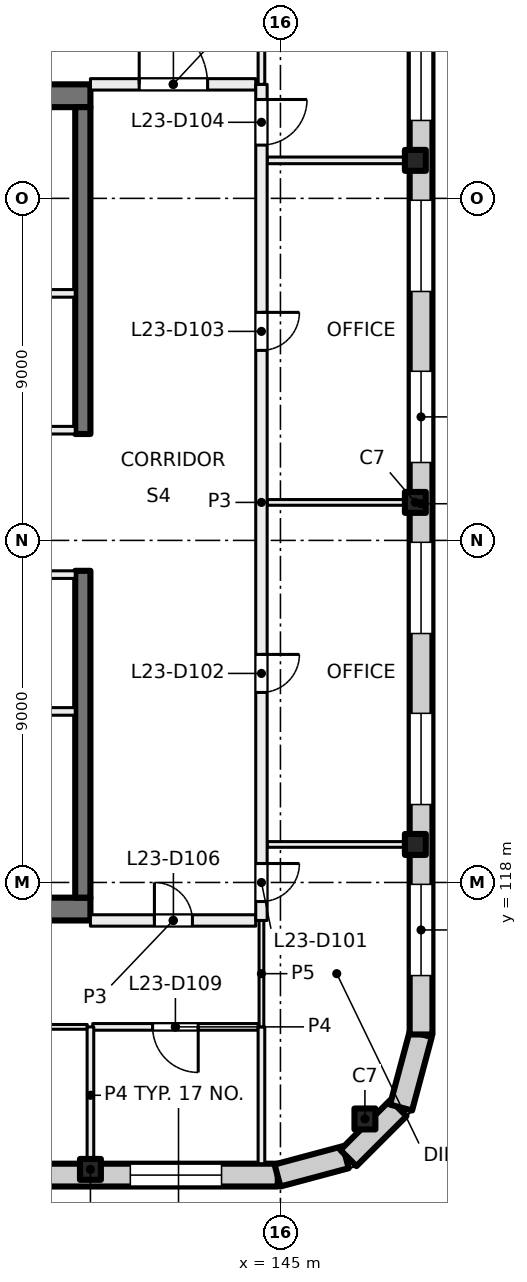
"""IFC4 building model, lengths in metres.
Left out: names, types, materials, properties, quantities, classifications, styles, units other than length and angle.
Written with IfcOpenShell. Run it as: python <this file> out.ifc"""

import sys

from ifc_helpers import new_model, si_unit, direction, frame, frame_2d, origin, origin_2d, place, context, subcontext, project, spatial, rectangle, extrude, element, fill, save


model = new_model("IFC4")
c1 = context("Model", 3, precision=1e-05, world=origin(), true_north=direction((0.0, 1.0)))
c2 = subcontext(c1, "Body", "Model", "MODEL_VIEW")
j1 = project(units=[si_unit("LENGTHUNIT", "METRE"), si_unit("PLANEANGLEUNIT", "RADIAN")], contexts=[c1])
p1 = place(None, origin())
s1 = spatial("IfcSite", under=j1, at=p1, CompositionType="ELEMENT")
p2 = place(p1, origin())
s2 = spatial("IfcBuilding", under=s1, at=p2, CompositionType="ELEMENT")
p3 = place(p2, frame((0.0, 0.0, 101.0)))
s3 = spatial("IfcBuildingStorey", under=s2, at=p3, CompositionType="ELEMENT", Elevation=101.0)
for number, where, z_axis, x_axis in (
    (1, (148.55, 119.0, 0.0), (0.0, 0.0, 1.0), (1.0, 0.0, 0.0)),
    (2, (148.55, 128.0, 0.0), (0.0, 0.0, 1.0), (1.0, 0.0, 0.0)),
    (3, (148.55, 137.0, 0.0), (0.0, 0.0, 1.0), (1.0, 0.0, 0.0)),
    (4, (140.0, 110.45, 0.0), (0.0, 0.0, 1.0), (1.0, 0.0, 0.0)),
    (5, (147.223, 111.777, 0.0), (0.0, 0.0, 1.0), (1.0, 0.0, 0.0)),
):
    element("IfcColumn", number, at=place(p3, frame(where, z_axis=z_axis, x_axis=x_axis)), inside=s3, PredefinedType="COLUMN", context=c2, shape_type="SweptSolid", body=[
        extrude(rectangle(XDim=0.55, YDim=0.55, at=origin_2d()), origin(), (0.0, 0.0, 1.0), 4.0),
    ])
for number, where, z_axis, x_axis in (
    (6, (135.4, 117.3, 0.0), (0.0, 0.0, 1.0), (1.0, 0.0, 0.0)),
    (7, (135.4, 138.7, 0.0), (0.0, 0.0, 1.0), (1.0, 0.0, 0.0)),
):
    element("IfcWall", number, at=place(p3, frame(where, z_axis=z_axis, x_axis=x_axis)), inside=s3, PredefinedType="SHEAR", context=c2, shape_type="SweptSolid", body=[
        extrude(rectangle(XDim=4.6, YDim=0.6, at=frame_2d((2.3, 0.0))), origin(), (0.0, 0.0, 1.0), 4.0),
    ])
for number, where, z_axis, x_axis in (
    (8, (139.8, 117.6, 0.0), (0.0, 0.0, 1.0), (0.0, 1.0, 0.0)),
    (9, (139.8, 129.8, 0.0), (0.0, 0.0, 1.0), (0.0, 1.0, 0.0)),
):
    element("IfcWall", number, at=place(p3, frame(where, z_axis=z_axis, x_axis=x_axis)), inside=s3, PredefinedType="SHEAR", context=c2, shape_type="SweptSolid", body=[
        extrude(rectangle(XDim=8.6, YDim=0.4, at=frame_2d((4.3, 0.0))), origin(), (0.0, 0.0, 1.0), 4.0),
    ])
p4 = place(p3, frame((144.93, 110.3, 0.0), z_axis=(0.0, 0.0, 1.0), x_axis=(-1.0, 0.0, 0.0)))
e10 = element("IfcWall", 10, at=p4, inside=s3, PredefinedType="SOLIDWALL", context=c2, shape_type="SweptSolid", body=[
    extrude(rectangle(XDim=13.93, YDim=0.6, at=frame_2d((6.965, 0.0))), origin(), (0.0, 0.0, 1.0), 3.625),
])
p5 = place(p4, frame((1.48, 0.0, 0.9)))
e11 = element("IfcOpeningElement", 11, at=p5, cuts=e10, PredefinedType="OPENING", context=c2, shape_type="SweptSolid", body=[
    extrude(rectangle(XDim=2.4, YDim=2.4, at=frame_2d((1.2, 1.2))), frame((0.0, 0.31, 0.0), z_axis=(0.0, -1.0, 0.0), x_axis=(1.0, 0.0, 0.0)), (0.0, 0.0, 1.0), 0.62),
])
p6 = place(p4, frame((5.98, 0.0, 0.9)))
e12 = element("IfcOpeningElement", 12, at=p6, cuts=e10, PredefinedType="OPENING", context=c2, shape_type="SweptSolid", body=[
    extrude(rectangle(XDim=2.4, YDim=2.4, at=frame_2d((1.2, 1.2))), frame((0.0, 0.31, 0.0), z_axis=(0.0, -1.0, 0.0), x_axis=(1.0, 0.0, 0.0)), (0.0, 0.0, 1.0), 0.62),
])
p7 = place(p4, frame((10.48, 0.0, 0.9)))
e13 = element("IfcOpeningElement", 13, at=p7, cuts=e10, PredefinedType="OPENING", context=c2, shape_type="SweptSolid", body=[
    extrude(rectangle(XDim=2.4, YDim=2.4, at=frame_2d((1.2, 1.2))), frame((0.0, 0.31, 0.0), z_axis=(0.0, -1.0, 0.0), x_axis=(1.0, 0.0, 0.0)), (0.0, 0.0, 1.0), 0.62),
])
for number, where, z_axis, x_axis in (
    (14, (146.719, 110.771, 0.0), (0.0, 0.0, 1.0), (-0.966, -0.259, 0.0)),
    (15, (148.104, 112.064, 0.0), (0.0, 0.0, 1.0), (-0.707, -0.707, 0.0)),
):
    element("IfcWall", number, at=place(p3, frame(where, z_axis=z_axis, x_axis=x_axis)), inside=s3, PredefinedType="SOLIDWALL", context=c2, shape_type="SweptSolid", body=[
        extrude(rectangle(XDim=1.861, YDim=0.6, at=frame_2d((0.93, 0.0))), origin(), (0.0, 0.0, 1.0), 3.625),
    ])
p8 = place(p3, frame((148.692, 114.01, 0.0), z_axis=(0.0, 0.0, 1.0), x_axis=(-0.258839784042, -0.965920269068, 0.0)))
e16 = element("IfcWall", 16, at=p8, inside=s3, PredefinedType="SOLIDWALL", context=c2, shape_type="SweptSolid", body=[
    extrude(rectangle(XDim=2.0, YDim=0.6, at=frame_2d((1.0, 0.0))), origin(), (0.0, 0.0, 1.0), 3.625),
])
p9 = place(p3, frame((148.7, 141.93, 0.0), z_axis=(0.0, 0.0, 1.0), x_axis=(0.0, -1.0, 0.0)))
e17 = element("IfcWall", 17, at=p9, inside=s3, PredefinedType="SOLIDWALL", context=c2, shape_type="SweptSolid", body=[
    extrude(rectangle(XDim=27.93, YDim=0.6, at=frame_2d((13.965, 0.0))), origin(), (0.0, 0.0, 1.0), 3.625),
])
p10 = place(p9, frame((1.48, 0.0, 0.9)))
e18 = element("IfcOpeningElement", 18, at=p10, cuts=e17, PredefinedType="OPENING", context=c2, shape_type="SweptSolid", body=[
    extrude(rectangle(XDim=2.4, YDim=2.4, at=frame_2d((1.2, 1.2))), frame((0.0, 0.31, 0.0), z_axis=(0.0, -1.0, 0.0), x_axis=(1.0, 0.0, 0.0)), (0.0, 0.0, 1.0), 0.62),
])
p11 = place(p9, frame((5.98, 0.0, 0.9)))
e19 = element("IfcOpeningElement", 19, at=p11, cuts=e17, PredefinedType="OPENING", context=c2, shape_type="SweptSolid", body=[
    extrude(rectangle(XDim=2.4, YDim=2.4, at=frame_2d((1.2, 1.2))), frame((0.0, 0.31, 0.0), z_axis=(0.0, -1.0, 0.0), x_axis=(1.0, 0.0, 0.0)), (0.0, 0.0, 1.0), 0.62),
])
p12 = place(p9, frame((10.48, 0.0, 0.9)))
e20 = element("IfcOpeningElement", 20, at=p12, cuts=e17, PredefinedType="OPENING", context=c2, shape_type="SweptSolid", body=[
    extrude(rectangle(XDim=2.4, YDim=2.4, at=frame_2d((1.2, 1.2))), frame((0.0, 0.31, 0.0), z_axis=(0.0, -1.0, 0.0), x_axis=(1.0, 0.0, 0.0)), (0.0, 0.0, 1.0), 0.62),
])
p13 = place(p9, frame((14.98, 0.0, 0.9)))
e21 = element("IfcOpeningElement", 21, at=p13, cuts=e17, PredefinedType="OPENING", context=c2, shape_type="SweptSolid", body=[
    extrude(rectangle(XDim=2.4, YDim=2.4, at=frame_2d((1.2, 1.2))), frame((0.0, 0.31, 0.0), z_axis=(0.0, -1.0, 0.0), x_axis=(1.0, 0.0, 0.0)), (0.0, 0.0, 1.0), 0.62),
])
p14 = place(p9, frame((19.48, 0.0, 0.9)))
e22 = element("IfcOpeningElement", 22, at=p14, cuts=e17, PredefinedType="OPENING", context=c2, shape_type="SweptSolid", body=[
    extrude(rectangle(XDim=2.4, YDim=2.4, at=frame_2d((1.2, 1.2))), frame((0.0, 0.31, 0.0), z_axis=(0.0, -1.0, 0.0), x_axis=(1.0, 0.0, 0.0)), (0.0, 0.0, 1.0), 0.62),
])
p15 = place(p9, frame((23.98, 0.0, 0.9)))
e23 = element("IfcOpeningElement", 23, at=p15, cuts=e17, PredefinedType="OPENING", context=c2, shape_type="SweptSolid", body=[
    extrude(rectangle(XDim=2.4, YDim=2.4, at=frame_2d((1.2, 1.2))), frame((0.0, 0.31, 0.0), z_axis=(0.0, -1.0, 0.0), x_axis=(1.0, 0.0, 0.0)), (0.0, 0.0, 1.0), 0.62),
])
p16 = place(p3, frame((135.0, 129.9, 0.0), z_axis=(0.0, 0.0, 1.0), x_axis=(1.0, 0.0, 0.0)))
e24 = element("IfcWall", 24, at=p16, inside=s3, PredefinedType="PARTITIONING", context=c2, shape_type="SweptSolid", body=[
    extrude(rectangle(XDim=4.6, YDim=0.2, at=frame_2d((2.3, 0.0))), origin(), (0.0, 0.0, 1.0), 3.625),
])
p17 = place(p16, frame((1.7, 0.0, 0.0)))
e25 = element("IfcOpeningElement", 25, at=p17, cuts=e24, PredefinedType="OPENING", context=c2, shape_type="SweptSolid", body=[
    extrude(rectangle(XDim=1.2, YDim=2.1, at=frame_2d((0.6, 1.05))), frame((0.0, 0.11, 0.0), z_axis=(0.0, -1.0, 0.0), x_axis=(1.0, 0.0, 0.0)), (0.0, 0.0, 1.0), 0.22),
])
p18 = place(p3, frame((135.0, 133.5, 0.0), z_axis=(0.0, 0.0, 1.0), x_axis=(1.0, 0.0, 0.0)))
e26 = element("IfcWall", 26, at=p18, inside=s3, PredefinedType="PARTITIONING", context=c2, shape_type="SweptSolid", body=[
    extrude(rectangle(XDim=4.6, YDim=0.2, at=frame_2d((2.3, 0.0))), origin(), (0.0, 0.0, 1.0), 3.625),
])
p19 = place(p18, frame((1.75, 0.0, 0.0)))
e27 = element("IfcOpeningElement", 27, at=p19, cuts=e26, PredefinedType="OPENING", context=c2, shape_type="SweptSolid", body=[
    extrude(rectangle(XDim=1.5, YDim=2.1, at=frame_2d((0.75, 1.05))), frame((0.0, 0.11, 0.0), z_axis=(0.0, -1.0, 0.0), x_axis=(1.0, 0.0, 0.0)), (0.0, 0.0, 1.0), 0.22),
])
p20 = place(p3, frame((139.6, 126.1, 0.0), z_axis=(0.0, 0.0, 1.0), x_axis=(-1.0, 0.0, 0.0)))
e28 = element("IfcWall", 28, at=p20, inside=s3, PredefinedType="PARTITIONING", context=c2, shape_type="SweptSolid", body=[
    extrude(rectangle(XDim=4.6, YDim=0.2, at=frame_2d((2.3, 0.0))), origin(), (0.0, 0.0, 1.0), 3.625),
])
p21 = place(p20, frame((1.7, 0.0, 0.0)))
e29 = element("IfcOpeningElement", 29, at=p21, cuts=e28, PredefinedType="OPENING", context=c2, shape_type="SweptSolid", body=[
    extrude(rectangle(XDim=1.2, YDim=2.1, at=frame_2d((0.6, 1.05))), frame((0.0, 0.11, 0.0), z_axis=(0.0, -1.0, 0.0), x_axis=(1.0, 0.0, 0.0)), (0.0, 0.0, 1.0), 0.22),
])
p22 = place(p3, frame((139.6, 122.5, 0.0), z_axis=(0.0, 0.0, 1.0), x_axis=(-1.0, 0.0, 0.0)))
e30 = element("IfcWall", 30, at=p22, inside=s3, PredefinedType="PARTITIONING", context=c2, shape_type="SweptSolid", body=[
    extrude(rectangle(XDim=4.6, YDim=0.2, at=frame_2d((2.3, 0.0))), origin(), (0.0, 0.0, 1.0), 3.625),
])
p23 = place(p22, frame((1.35, 0.0, 0.0)))
e31 = element("IfcOpeningElement", 31, at=p23, cuts=e30, PredefinedType="OPENING", context=c2, shape_type="SweptSolid", body=[
    extrude(rectangle(XDim=1.5, YDim=2.1, at=frame_2d((0.75, 1.05))), frame((0.0, 0.11, 0.0), z_axis=(0.0, -1.0, 0.0), x_axis=(1.0, 0.0, 0.0)), (0.0, 0.0, 1.0), 0.22),
])
p24 = place(p3, frame((139.916, 114.2, 0.0), z_axis=(0.0, 0.0, 1.0), x_axis=(-1.0, 0.0, 0.0)))
e32 = element("IfcWall", 32, at=p24, inside=s3, PredefinedType="PARTITIONING", context=c2, shape_type="SweptSolid", body=[
    extrude(rectangle(XDim=8.919, YDim=0.125, at=frame_2d((4.459, 0.0))), origin(), (0.0, 0.0, 1.0), 3.625),
])
p25 = place(p24, frame((1.698, 0.0, 0.0)))
e33 = element("IfcOpeningElement", 33, at=p25, cuts=e32, PredefinedType="OPENING", context=c2, shape_type="SweptSolid", body=[
    extrude(rectangle(XDim=1.0, YDim=2.1, at=frame_2d((0.5, 1.05))), frame((0.0, 0.073, 0.0), z_axis=(0.0, -1.0, 0.0), x_axis=(1.0, 0.0, 0.0)), (0.0, 0.0, 1.0), 0.145),
])
p26 = place(p24, frame((6.266, 0.0, 0.0)))
e34 = element("IfcOpeningElement", 34, at=p26, cuts=e32, PredefinedType="OPENING", context=c2, shape_type="SweptSolid", body=[
    extrude(rectangle(XDim=0.8, YDim=2.1, at=frame_2d((0.4, 1.05))), frame((0.0, 0.073, 0.0), z_axis=(0.0, -1.0, 0.0), x_axis=(1.0, 0.0, 0.0)), (0.0, 0.0, 1.0), 0.145),
])
p27 = place(p3, frame((144.412, 114.2, 0.0), z_axis=(0.0, 0.0, 1.0), x_axis=(-1.0, 0.0, 0.0)))
e35 = element("IfcWall", 35, at=p27, inside=s3, PredefinedType="PARTITIONING", context=c2, shape_type="SweptSolid", body=[
    extrude(rectangle(XDim=4.352, YDim=0.175, at=frame_2d((2.176, 0.0))), origin(), (0.0, 0.0, 1.0), 3.625),
])
p28 = place(p27, frame((1.576, 0.0, 0.0)))
e36 = element("IfcOpeningElement", 36, at=p28, cuts=e35, PredefinedType="OPENING", context=c2, shape_type="SweptSolid", body=[
    extrude(rectangle(XDim=1.2, YDim=2.1, at=frame_2d((0.6, 1.05))), frame((0.0, 0.097, 0.0), z_axis=(0.0, -1.0, 0.0), x_axis=(1.0, 0.0, 0.0)), (0.0, 0.0, 1.0), 0.195),
])
p29 = place(p3, frame((140.0, 110.6, 0.0), z_axis=(0.0, 0.0, 1.0), x_axis=(0.0, 1.0, 0.0)))
e37 = element("IfcWall", 37, at=p29, inside=s3, PredefinedType="PARTITIONING", context=c2, shape_type="SweptSolid", body=[
    extrude(rectangle(XDim=3.6, YDim=0.175, at=frame_2d((1.8, 0.0))), origin(), (0.0, 0.0, 1.0), 3.625),
])
p30 = place(p3, frame((140.0, 139.0, 0.0), z_axis=(0.0, 0.0, 1.0), x_axis=(1.0, 0.0, 0.0)))
e38 = element("IfcWall", 38, at=p30, inside=s3, PredefinedType="PARTITIONING", context=c2, shape_type="SweptSolid", body=[
    extrude(rectangle(XDim=4.35, YDim=0.3, at=frame_2d((2.175, 0.0))), origin(), (0.0, 0.0, 1.0), 3.625),
])
p31 = place(p30, frame((1.283, 0.0, 0.0)))
e39 = element("IfcOpeningElement", 39, at=p31, cuts=e38, PredefinedType="OPENING", context=c2, shape_type="SweptSolid", body=[
    extrude(rectangle(XDim=1.8, YDim=2.1, at=frame_2d((0.9, 1.05))), frame((0.0, 0.16, 0.0), z_axis=(0.0, -1.0, 0.0), x_axis=(1.0, 0.0, 0.0)), (0.0, 0.0, 1.0), 0.32),
])
p32 = place(p3, frame((144.5, 114.2, 0.0), z_axis=(0.0, 0.0, 1.0), x_axis=(0.0, -1.0, 0.0)))
e40 = element("IfcWall", 40, at=p32, inside=s3, PredefinedType="PARTITIONING", context=c2, shape_type="SweptSolid", body=[
    extrude(rectangle(XDim=3.6, YDim=0.175, at=frame_2d((1.8, 0.0))), origin(), (0.0, 0.0, 1.0), 3.625),
])
p33 = place(p3, frame((140.0, 117.0, 0.0), z_axis=(0.0, 0.0, 1.0), x_axis=(1.0, 0.0, 0.0)))
e41 = element("IfcWall", 41, at=p33, inside=s3, PredefinedType="PARTITIONING", context=c2, shape_type="SweptSolid", body=[
    extrude(rectangle(XDim=4.35, YDim=0.3, at=frame_2d((2.175, 0.0))), origin(), (0.0, 0.0, 1.0), 3.625),
])
p34 = place(p33, frame((1.684, 0.0, 0.0)))
e42 = element("IfcOpeningElement", 42, at=p34, cuts=e41, PredefinedType="OPENING", context=c2, shape_type="SweptSolid", body=[
    extrude(rectangle(XDim=1.0, YDim=2.1, at=frame_2d((0.5, 1.05))), frame((0.0, 0.16, 0.0), z_axis=(0.0, -1.0, 0.0), x_axis=(1.0, 0.0, 0.0)), (0.0, 0.0, 1.0), 0.32),
])
p35 = place(p3, frame((144.5, 117.0, 0.0), z_axis=(0.0, 0.0, 1.0), x_axis=(0.0, -1.0, 0.0)))
e43 = element("IfcWall", 43, at=p35, inside=s3, PredefinedType="PARTITIONING", context=c2, shape_type="SweptSolid", body=[
    extrude(rectangle(XDim=2.8, YDim=0.125, at=frame_2d((1.4, 0.0))), origin(), (0.0, 0.0, 1.0), 3.625),
])
for number, where, z_axis, x_axis in (
    (44, (144.65, 119.0, 0.0), (0.0, 0.0, 1.0), (1.0, 0.0, 0.0)),
    (45, (144.65, 128.0, 0.0), (0.0, 0.0, 1.0), (1.0, 0.0, 0.0)),
):
    element("IfcWall", number, at=place(p3, frame(where, z_axis=z_axis, x_axis=x_axis)), inside=s3, PredefinedType="PARTITIONING", context=c2, shape_type="SweptSolid", body=[
        extrude(rectangle(XDim=3.75, YDim=0.15, at=frame_2d((1.875, 0.0))), origin(), (0.0, 0.0, 1.0), 3.625),
    ])
p36 = place(p3, frame((144.65, 137.0, 0.0), z_axis=(0.0, 0.0, 1.0), x_axis=(1.0, 0.0, 0.0)))
e46 = element("IfcWall", 46, at=p36, inside=s3, PredefinedType="PARTITIONING", context=c2, shape_type="SweptSolid", body=[
    extrude(rectangle(XDim=3.75, YDim=0.175, at=frame_2d((1.875, 0.0))), origin(), (0.0, 0.0, 1.0), 3.625),
])
p37 = place(p3, frame((144.5, 139.0, 0.0), z_axis=(0.0, 0.0, 1.0), x_axis=(0.0, -1.0, 0.0)))
e47 = element("IfcWall", 47, at=p37, inside=s3, PredefinedType="PARTITIONING", context=c2, shape_type="SweptSolid", body=[
    extrude(rectangle(XDim=22.0, YDim=0.3, at=frame_2d((11.0, 0.0))), origin(), (0.0, 0.0, 1.0), 3.625),
])
p38 = place(p37, frame((20.501, 0.0, 0.0)))
e48 = element("IfcOpeningElement", 48, at=p38, cuts=e47, PredefinedType="OPENING", context=c2, shape_type="SweptSolid", body=[
    extrude(rectangle(XDim=1.0, YDim=2.1, at=frame_2d((0.5, 1.05))), frame((0.0, 0.16, 0.0), z_axis=(0.0, -1.0, 0.0), x_axis=(1.0, 0.0, 0.0)), (0.0, 0.0, 1.0), 0.32),
])
p39 = place(p37, frame((15.0, 0.0, 0.0)))
e49 = element("IfcOpeningElement", 49, at=p39, cuts=e47, PredefinedType="OPENING", context=c2, shape_type="SweptSolid", body=[
    extrude(rectangle(XDim=1.0, YDim=2.1, at=frame_2d((0.5, 1.05))), frame((0.0, 0.16, 0.0), z_axis=(0.0, -1.0, 0.0), x_axis=(1.0, 0.0, 0.0)), (0.0, 0.0, 1.0), 0.32),
])
p40 = place(p37, frame((6.0, 0.0, 0.0)))
e50 = element("IfcOpeningElement", 50, at=p40, cuts=e47, PredefinedType="OPENING", context=c2, shape_type="SweptSolid", body=[
    extrude(rectangle(XDim=1.0, YDim=2.1, at=frame_2d((0.5, 1.05))), frame((0.0, 0.16, 0.0), z_axis=(0.0, -1.0, 0.0), x_axis=(1.0, 0.0, 0.0)), (0.0, 0.0, 1.0), 0.32),
])
p41 = place(p37, frame((0.398, 0.0, 0.0)))
e51 = element("IfcOpeningElement", 51, at=p41, cuts=e47, PredefinedType="OPENING", context=c2, shape_type="SweptSolid", body=[
    extrude(rectangle(XDim=1.2, YDim=2.1, at=frame_2d((0.6, 1.05))), frame((0.0, 0.16, 0.0), z_axis=(0.0, -1.0, 0.0), x_axis=(1.0, 0.0, 0.0)), (0.0, 0.0, 1.0), 0.32),
])
p42 = place(p3, frame((144.5, 145.4, 0.0), z_axis=(0.0, 0.0, 1.0), x_axis=(0.0, -1.0, 0.0)))
e52 = element("IfcWall", 52, at=p42, inside=s3, PredefinedType="PARTITIONING", context=c2, shape_type="SweptSolid", body=[
    extrude(rectangle(XDim=6.4, YDim=0.175, at=frame_2d((3.2, 0.0))), origin(), (0.0, 0.0, 1.0), 3.625),
])
p43 = place(p5, origin())
e53 = element("IfcWindow", 53, at=p43, inside=s3, PartitioningType="SINGLE_PANEL", PredefinedType="WINDOW", context=c2, shape_type="SweptSolid", body=[
    extrude(rectangle(XDim=2.4, YDim=2.4, at=frame_2d((1.2, 1.2))), frame((0.0, 0.03, 0.0), z_axis=(0.0, -1.0, 0.0), x_axis=(1.0, 0.0, 0.0)), (0.0, 0.0, 1.0), 0.06),
])
fill(e11, e53)
p44 = place(p10, origin())
e54 = element("IfcWindow", 54, at=p44, inside=s3, PartitioningType="SINGLE_PANEL", PredefinedType="WINDOW", context=c2, shape_type="SweptSolid", body=[
    extrude(rectangle(XDim=2.4, YDim=2.4, at=frame_2d((1.2, 1.2))), frame((0.0, 0.03, 0.0), z_axis=(0.0, -1.0, 0.0), x_axis=(1.0, 0.0, 0.0)), (0.0, 0.0, 1.0), 0.06),
])
fill(e18, e54)
p45 = place(p11, origin())
e55 = element("IfcWindow", 55, at=p45, inside=s3, PartitioningType="SINGLE_PANEL", PredefinedType="WINDOW", context=c2, shape_type="SweptSolid", body=[
    extrude(rectangle(XDim=2.4, YDim=2.4, at=frame_2d((1.2, 1.2))), frame((0.0, 0.03, 0.0), z_axis=(0.0, -1.0, 0.0), x_axis=(1.0, 0.0, 0.0)), (0.0, 0.0, 1.0), 0.06),
])
fill(e19, e55)
p46 = place(p12, origin())
e56 = element("IfcWindow", 56, at=p46, inside=s3, PartitioningType="SINGLE_PANEL", PredefinedType="WINDOW", context=c2, shape_type="SweptSolid", body=[
    extrude(rectangle(XDim=2.4, YDim=2.4, at=frame_2d((1.2, 1.2))), frame((0.0, 0.03, 0.0), z_axis=(0.0, -1.0, 0.0), x_axis=(1.0, 0.0, 0.0)), (0.0, 0.0, 1.0), 0.06),
])
fill(e20, e56)
p47 = place(p13, origin())
e57 = element("IfcWindow", 57, at=p47, inside=s3, PartitioningType="SINGLE_PANEL", PredefinedType="WINDOW", context=c2, shape_type="SweptSolid", body=[
    extrude(rectangle(XDim=2.4, YDim=2.4, at=frame_2d((1.2, 1.2))), frame((0.0, 0.03, 0.0), z_axis=(0.0, -1.0, 0.0), x_axis=(1.0, 0.0, 0.0)), (0.0, 0.0, 1.0), 0.06),
])
fill(e21, e57)
p48 = place(p14, origin())
e58 = element("IfcWindow", 58, at=p48, inside=s3, PartitioningType="SINGLE_PANEL", PredefinedType="WINDOW", context=c2, shape_type="SweptSolid", body=[
    extrude(rectangle(XDim=2.4, YDim=2.4, at=frame_2d((1.2, 1.2))), frame((0.0, 0.03, 0.0), z_axis=(0.0, -1.0, 0.0), x_axis=(1.0, 0.0, 0.0)), (0.0, 0.0, 1.0), 0.06),
])
fill(e22, e58)
p49 = place(p15, origin())
e59 = element("IfcWindow", 59, at=p49, inside=s3, PartitioningType="SINGLE_PANEL", PredefinedType="WINDOW", context=c2, shape_type="SweptSolid", body=[
    extrude(rectangle(XDim=2.4, YDim=2.4, at=frame_2d((1.2, 1.2))), frame((0.0, 0.03, 0.0), z_axis=(0.0, -1.0, 0.0), x_axis=(1.0, 0.0, 0.0)), (0.0, 0.0, 1.0), 0.06),
])
fill(e23, e59)
p50 = place(p38, origin())
e60 = element("IfcDoor", 60, at=p50, inside=s3, OperationType="SINGLE_SWING_LEFT", PredefinedType="DOOR", context=c2, shape_type="SweptSolid", body=[
    extrude(rectangle(XDim=1.0, YDim=2.1, at=frame_2d((0.5, 1.05))), frame((0.0, 0.025, 0.0), z_axis=(0.0, -1.0, 0.0), x_axis=(1.0, 0.0, 0.0)), (0.0, 0.0, 1.0), 0.05),
])
fill(e48, e60)
p51 = place(p39, origin())
e61 = element("IfcDoor", 61, at=p51, inside=s3, OperationType="SINGLE_SWING_LEFT", PredefinedType="DOOR", context=c2, shape_type="SweptSolid", body=[
    extrude(rectangle(XDim=1.0, YDim=2.1, at=frame_2d((0.5, 1.05))), frame((0.0, 0.025, 0.0), z_axis=(0.0, -1.0, 0.0), x_axis=(1.0, 0.0, 0.0)), (0.0, 0.0, 1.0), 0.05),
])
fill(e49, e61)
p52 = place(p40, origin())
e62 = element("IfcDoor", 62, at=p52, inside=s3, OperationType="SINGLE_SWING_LEFT", PredefinedType="DOOR", context=c2, shape_type="SweptSolid", body=[
    extrude(rectangle(XDim=1.0, YDim=2.1, at=frame_2d((0.5, 1.05))), frame((0.0, 0.025, 0.0), z_axis=(0.0, -1.0, 0.0), x_axis=(1.0, 0.0, 0.0)), (0.0, 0.0, 1.0), 0.05),
])
fill(e50, e62)
p53 = place(p41, origin())
e63 = element("IfcDoor", 63, at=p53, inside=s3, OperationType="DOUBLE_DOOR_SINGLE_SWING", PredefinedType="DOOR", context=c2, shape_type="SweptSolid", body=[
    extrude(rectangle(XDim=1.2, YDim=2.1, at=frame_2d((0.6, 1.05))), frame((0.0, 0.025, 0.0), z_axis=(0.0, -1.0, 0.0), x_axis=(1.0, 0.0, 0.0)), (0.0, 0.0, 1.0), 0.05),
])
fill(e51, e63)
p54 = place(p31, origin())
e64 = element("IfcDoor", 64, at=p54, inside=s3, OperationType="DOUBLE_DOOR_SINGLE_SWING", PredefinedType="DOOR", context=c2, shape_type="SweptSolid", body=[
    extrude(rectangle(XDim=1.8, YDim=2.1, at=frame_2d((0.9, 1.05))), frame((0.0, 0.025, 0.0), z_axis=(0.0, -1.0, 0.0), x_axis=(1.0, 0.0, 0.0)), (0.0, 0.0, 1.0), 0.05),
])
fill(e39, e64)
p55 = place(p34, origin())
e65 = element("IfcDoor", 65, at=p55, inside=s3, OperationType="SINGLE_SWING_LEFT", PredefinedType="DOOR", context=c2, shape_type="SweptSolid", body=[
    extrude(rectangle(XDim=1.0, YDim=2.1, at=frame_2d((0.5, 1.05))), frame((0.0, 0.025, 0.0), z_axis=(0.0, -1.0, 0.0), x_axis=(1.0, 0.0, 0.0)), (0.0, 0.0, 1.0), 0.05),
])
fill(e42, e65)
p56 = place(p28, origin())
e66 = element("IfcDoor", 66, at=p56, inside=s3, OperationType="DOUBLE_DOOR_SINGLE_SWING", PredefinedType="DOOR", context=c2, shape_type="SweptSolid", body=[
    extrude(rectangle(XDim=1.2, YDim=2.1, at=frame_2d((0.6, 1.05))), frame((0.0, 0.025, 0.0), z_axis=(0.0, -1.0, 0.0), x_axis=(1.0, 0.0, 0.0)), (0.0, 0.0, 1.0), 0.05),
])
fill(e36, e66)
save(model, sys.argv[1])
